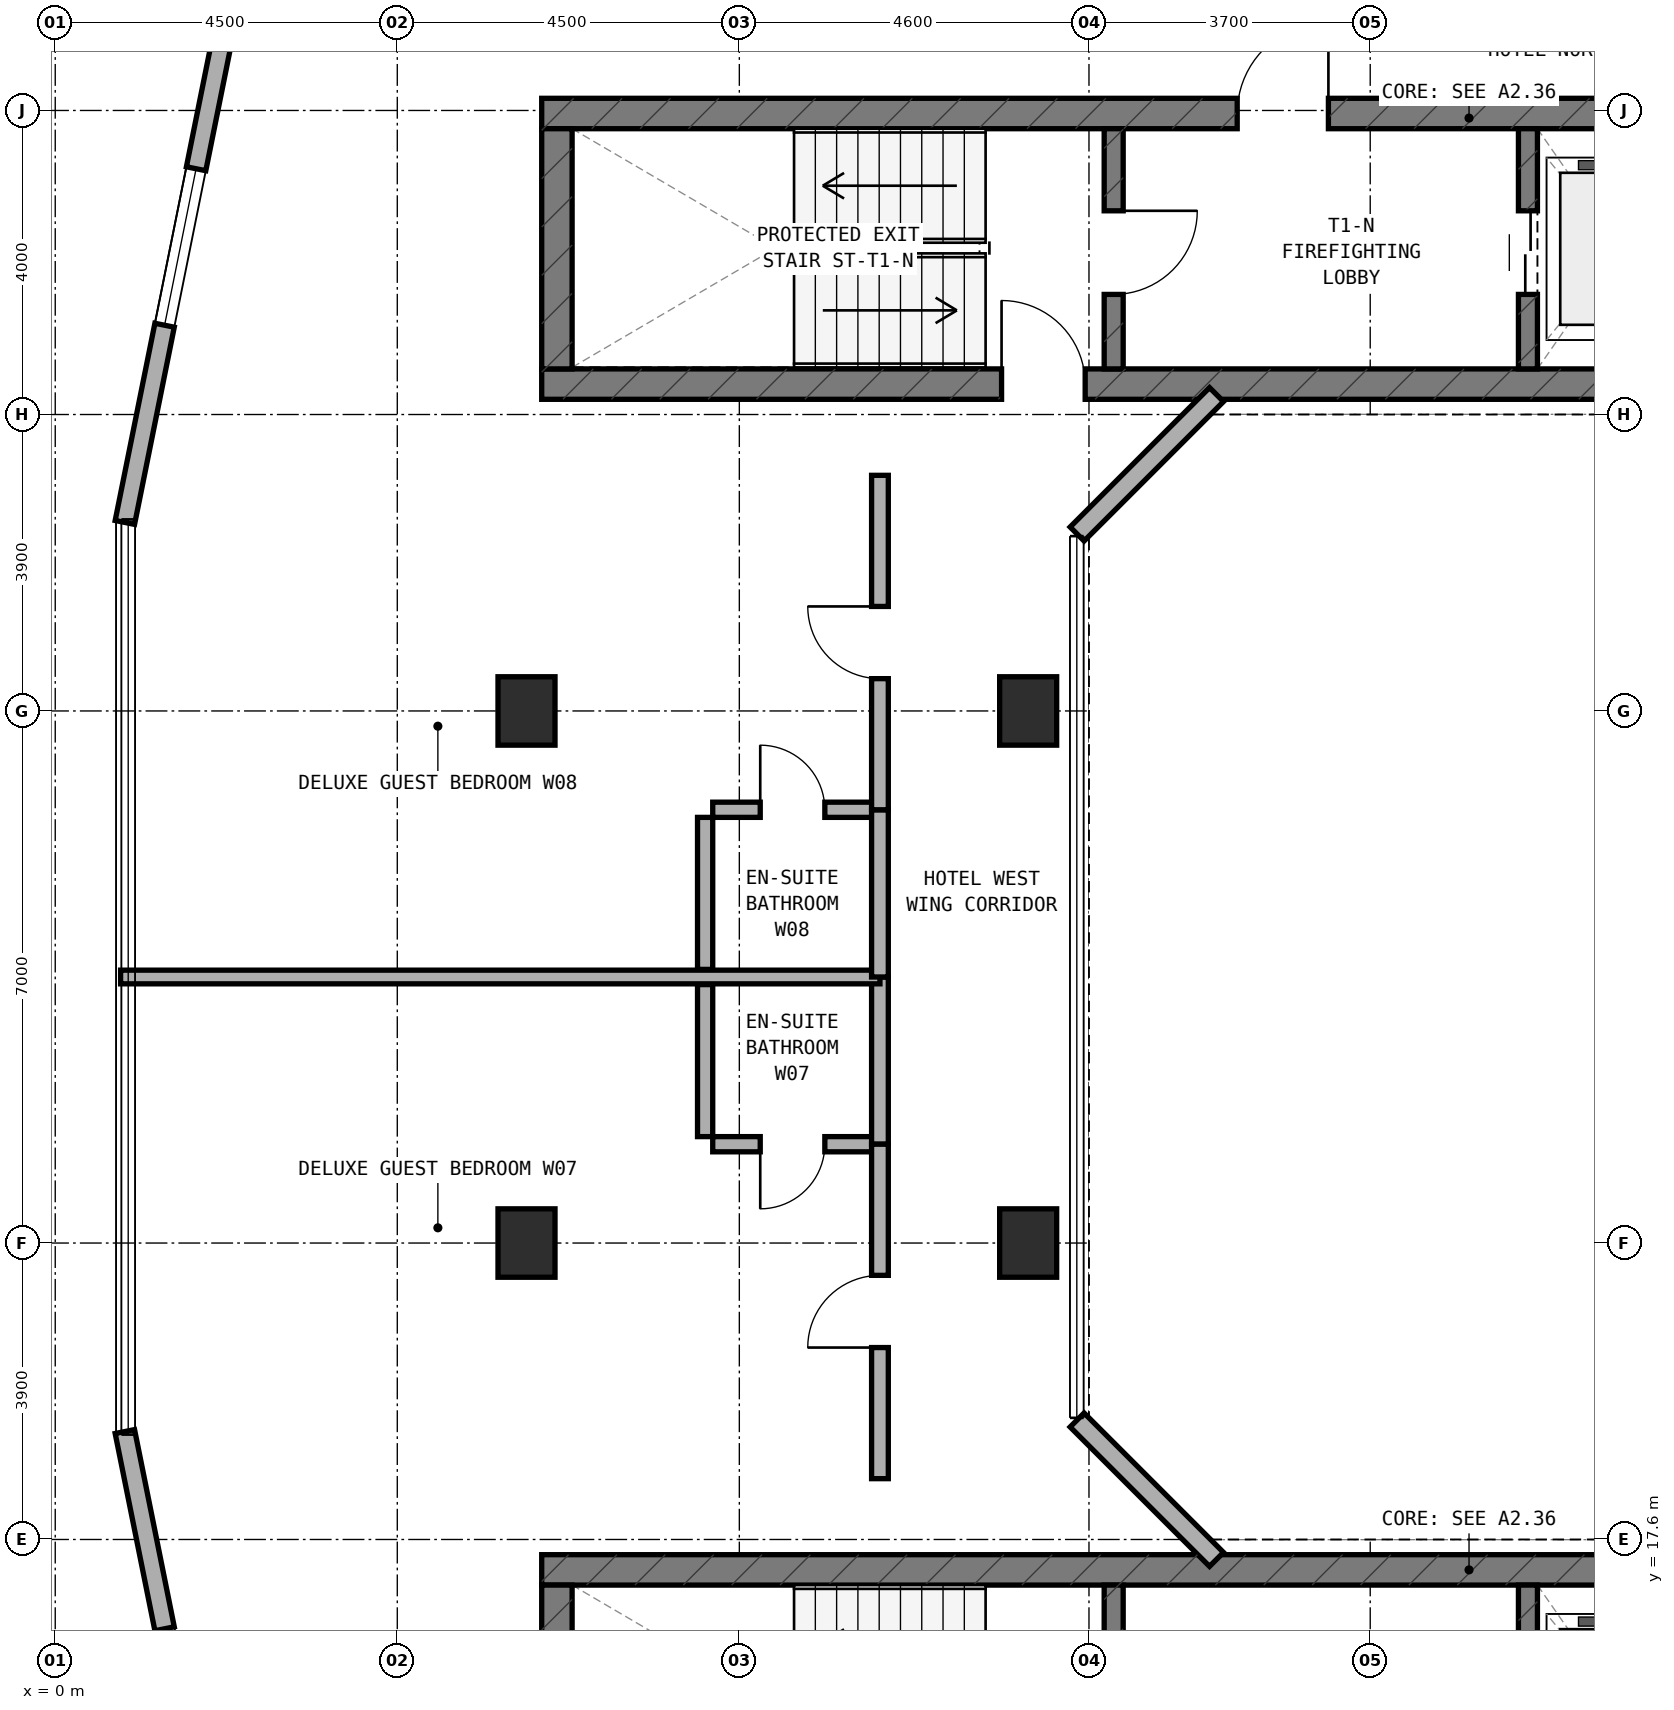
"""IFC4 building model, lengths in metres.
Left out: names, types, materials, properties, quantities, classifications, styles, units other than length and angle.
Written with IfcOpenShell. Run it as: python <this file> out.ifc"""

import sys

from ifc_helpers import new_model, si_unit, direction, frame, frame_2d, origin, origin_2d, place, context, subcontext, project, spatial, rectangle, extrude, element, fill, save


model = new_model("IFC4")
c1 = context("Model", 3, precision=1e-05, world=origin(), true_north=direction((0.0, 1.0)))
c2 = subcontext(c1, "Body", "Model", "MODEL_VIEW")
j1 = project(units=[si_unit("LENGTHUNIT", "METRE"), si_unit("PLANEANGLEUNIT", "RADIAN")], contexts=[c1])
p1 = place(None, origin())
s1 = spatial("IfcSite", under=j1, at=p1, CompositionType="ELEMENT")
p2 = place(p1, origin())
s2 = spatial("IfcBuilding", under=s1, at=p2, CompositionType="ELEMENT")
p3 = place(p2, frame((0.0, 0.0, 159.0)))
s3 = spatial("IfcBuildingStorey", under=s2, at=p3, CompositionType="ELEMENT", Elevation=159.0)
p4 = place(p3, frame((6.4, 32.8, 0.0), z_axis=(0.0, 0.0, 1.0), x_axis=(1.0, 0.0, 0.0)))
e1 = element("IfcWall", 1, at=p4, inside=s3, PredefinedType="SHEAR", context=c2, shape_type="SweptSolid", body=[
    extrude(rectangle(XDim=24.4, YDim=0.4, at=frame_2d((12.2, 0.0))), origin(), (0.0, 0.0, 1.0), 3.5),
])
p5 = place(p4, frame((6.05, 0.0, 0.0)))
e2 = element("IfcOpeningElement", 2, at=p5, cuts=e1, PredefinedType="OPENING", context=c2, shape_type="SweptSolid", body=[
    extrude(rectangle(XDim=1.1, YDim=2.15, at=frame_2d((0.55, 1.075))), frame((0.0, 0.21, 0.0), z_axis=(0.0, -1.0, 0.0), x_axis=(1.0, 0.0, 0.0)), (0.0, 0.0, 1.0), 0.42),
])
p6 = place(p3, frame((6.4, 36.36, 0.0), z_axis=(0.0, 0.0, 1.0), x_axis=(1.0, 0.0, 0.0)))
e3 = element("IfcWall", 3, at=p6, inside=s3, PredefinedType="SHEAR", context=c2, shape_type="SweptSolid", body=[
    extrude(rectangle(XDim=24.4, YDim=0.4, at=frame_2d((12.2, 0.0))), origin(), (0.0, 0.0, 1.0), 3.5),
])
p7 = place(p6, frame((9.15, 0.0, 0.0)))
e4 = element("IfcOpeningElement", 4, at=p7, cuts=e3, PredefinedType="OPENING", context=c2, shape_type="SweptSolid", body=[
    extrude(rectangle(XDim=1.2, YDim=2.15, at=frame_2d((0.6, 1.075))), frame((0.0, 0.21, 0.0), z_axis=(0.0, -1.0, 0.0), x_axis=(1.0, 0.0, 0.0)), (0.0, 0.0, 1.0), 0.42),
])
p8 = place(p6, frame((19.2, 0.0, 0.0)))
e5 = element("IfcOpeningElement", 5, at=p8, cuts=e3, PredefinedType="OPENING", context=c2, shape_type="SweptSolid", body=[
    extrude(rectangle(XDim=0.85, YDim=2.1, at=frame_2d((0.425, 1.05))), frame((0.0, 0.21, 0.0), z_axis=(0.0, -1.0, 0.0), x_axis=(1.0, 0.0, 0.0)), (0.0, 0.0, 1.0), 0.42),
])
p9 = place(p6, frame((16.94, 0.0, 0.0)))
e6 = element("IfcOpeningElement", 6, at=p9, cuts=e3, PredefinedType="OPENING", context=c2, shape_type="SweptSolid", body=[
    extrude(rectangle(XDim=0.85, YDim=2.1, at=frame_2d((0.425, 1.05))), frame((0.0, 0.21, 0.0), z_axis=(0.0, -1.0, 0.0), x_axis=(1.0, 0.0, 0.0)), (0.0, 0.0, 1.0), 0.42),
])
p10 = place(p3, frame((6.6, 33.0, 0.0), z_axis=(0.0, 0.0, 1.0), x_axis=(0.0, 1.0, 0.0)))
e7 = element("IfcWall", 7, at=p10, inside=s3, PredefinedType="SHEAR", context=c2, shape_type="SweptSolid", body=[
    extrude(rectangle(XDim=3.16, YDim=0.4, at=frame_2d((1.58, 0.0))), origin(), (0.0, 0.0, 1.0), 3.5),
])
p11 = place(p3, frame((13.925, 33.0, 0.0), z_axis=(0.0, 0.0, 1.0), x_axis=(0.0, 1.0, 0.0)))
e8 = element("IfcWall", 8, at=p11, inside=s3, PredefinedType="STANDARD", context=c2, shape_type="SweptSolid", body=[
    extrude(rectangle(XDim=3.16, YDim=0.25, at=frame_2d((1.58, 0.0))), origin(), (0.0, 0.0, 1.0), 3.22),
])
p12 = place(p11, frame((0.98, 0.0, 0.0)))
e9 = element("IfcOpeningElement", 9, at=p12, cuts=e8, PredefinedType="OPENING", context=c2, shape_type="SweptSolid", body=[
    extrude(rectangle(XDim=1.1, YDim=2.15, at=frame_2d((0.55, 1.075))), frame((0.0, 0.135, 0.0), z_axis=(0.0, -1.0, 0.0), x_axis=(1.0, 0.0, 0.0)), (0.0, 0.0, 1.0), 0.27),
])
p13 = place(p3, frame((19.375, 33.0, 0.0), z_axis=(0.0, 0.0, 1.0), x_axis=(0.0, 1.0, 0.0)))
e10 = element("IfcWall", 10, at=p13, inside=s3, PredefinedType="STANDARD", context=c2, shape_type="SweptSolid", body=[
    extrude(rectangle(XDim=3.16, YDim=0.25, at=frame_2d((1.58, 0.0))), origin(), (0.0, 0.0, 1.0), 3.22),
])
p14 = place(p13, frame((0.98, 0.0, 0.0)))
e11 = element("IfcOpeningElement", 11, at=p14, cuts=e10, PredefinedType="OPENING", context=c2, shape_type="SweptSolid", body=[
    extrude(rectangle(XDim=1.1, YDim=2.15, at=frame_2d((0.55, 1.075))), frame((0.0, 0.135, 0.0), z_axis=(0.0, -1.0, 0.0), x_axis=(1.0, 0.0, 0.0)), (0.0, 0.0, 1.0), 0.27),
])
p15 = place(p3, frame((6.4, 17.2, 0.0), z_axis=(0.0, 0.0, 1.0), x_axis=(1.0, 0.0, 0.0)))
e12 = element("IfcWall", 12, at=p15, inside=s3, PredefinedType="SHEAR", context=c2, shape_type="SweptSolid", body=[
    extrude(rectangle(XDim=24.4, YDim=0.4, at=frame_2d((12.2, 0.0))), origin(), (0.0, 0.0, 1.0), 3.5),
])
p16 = place(p3, frame((6.6, 13.84, 0.0), z_axis=(0.0, 0.0, 1.0), x_axis=(0.0, 1.0, 0.0)))
e13 = element("IfcWall", 13, at=p16, inside=s3, PredefinedType="SHEAR", context=c2, shape_type="SweptSolid", body=[
    extrude(rectangle(XDim=3.16, YDim=0.4, at=frame_2d((1.58, 0.0))), origin(), (0.0, 0.0, 1.0), 3.5),
])
p17 = place(p3, frame((13.925, 13.84, 0.0), z_axis=(0.0, 0.0, 1.0), x_axis=(0.0, 1.0, 0.0)))
e14 = element("IfcWall", 14, at=p17, inside=s3, PredefinedType="STANDARD", context=c2, shape_type="SweptSolid", body=[
    extrude(rectangle(XDim=3.16, YDim=0.25, at=frame_2d((1.58, 0.0))), origin(), (0.0, 0.0, 1.0), 3.22),
])
p18 = place(p17, frame((0.98, 0.0, 0.0)))
e15 = element("IfcOpeningElement", 15, at=p18, cuts=e14, PredefinedType="OPENING", context=c2, shape_type="SweptSolid", body=[
    extrude(rectangle(XDim=1.1, YDim=2.15, at=frame_2d((0.55, 1.075))), frame((0.0, 0.135, 0.0), z_axis=(0.0, -1.0, 0.0), x_axis=(1.0, 0.0, 0.0)), (0.0, 0.0, 1.0), 0.27),
])
p19 = place(p3, frame((19.375, 13.84, 0.0), z_axis=(0.0, 0.0, 1.0), x_axis=(0.0, 1.0, 0.0)))
e16 = element("IfcWall", 16, at=p19, inside=s3, PredefinedType="STANDARD", context=c2, shape_type="SweptSolid", body=[
    extrude(rectangle(XDim=3.16, YDim=0.25, at=frame_2d((1.58, 0.0))), origin(), (0.0, 0.0, 1.0), 3.22),
])
p20 = place(p19, frame((0.98, 0.0, 0.0)))
e17 = element("IfcOpeningElement", 17, at=p20, cuts=e16, PredefinedType="OPENING", context=c2, shape_type="SweptSolid", body=[
    extrude(rectangle(XDim=1.1, YDim=2.15, at=frame_2d((0.55, 1.075))), frame((0.0, 0.135, 0.0), z_axis=(0.0, -1.0, 0.0), x_axis=(1.0, 0.0, 0.0)), (0.0, 0.0, 1.0), 0.27),
])
for number, where, z_axis, x_axis in (
    (18, (6.2, 21.5, 0.0), (0.0, 0.0, 1.0), (1.0, 0.0, 0.0)),
    (19, (6.2, 28.5, 0.0), (0.0, 0.0, 1.0), (1.0, 0.0, 0.0)),
    (20, (12.8, 21.5, 0.0), (0.0, 0.0, 1.0), (1.0, 0.0, 0.0)),
    (21, (12.8, 28.5, 0.0), (0.0, 0.0, 1.0), (1.0, 0.0, 0.0)),
):
    element("IfcColumn", number, at=place(p3, frame(where, z_axis=z_axis, x_axis=x_axis)), inside=s3, PredefinedType="COLUMN", context=c2, shape_type="SweptSolid", body=[
        extrude(rectangle(XDim=0.75, YDim=0.9, at=origin_2d()), origin(), (0.0, 0.0, 1.0), 3.5),
    ])
p21 = place(p3, frame((2.729, 39.982, 0.0), z_axis=(0.0, 0.0, 1.0), x_axis=(-0.197435082048, -0.980315963543, 0.0)))
e22 = element("IfcWall", 22, at=p21, inside=s3, PredefinedType="STANDARD", context=c2, shape_type="SweptSolid", body=[
    extrude(rectangle(XDim=9.183, YDim=0.26, at=frame_2d((4.591, 0.0))), origin(), (0.0, 0.0, 1.0), 3.22),
])
p22 = place(p21, frame((4.436, 0.0, 0.85)))
e23 = element("IfcOpeningElement", 23, at=p22, cuts=e22, PredefinedType="OPENING", context=c2, shape_type="SweptSolid", body=[
    extrude(rectangle(XDim=2.1, YDim=1.5, at=frame_2d((1.05, 0.75))), frame((0.0, 0.14, 0.0), z_axis=(0.0, -1.0, 0.0), x_axis=(1.0, 0.0, 0.0)), (0.0, 0.0, 1.0), 0.28),
])
p23 = place(p3, frame((0.916, 19.02, 0.0), z_axis=(0.0, 0.0, 1.0), x_axis=(0.197435082048, -0.980315963543, 0.0)))
e24 = element("IfcWall", 24, at=p23, inside=s3, PredefinedType="STANDARD", context=c2, shape_type="SweptSolid", body=[
    extrude(rectangle(XDim=9.183, YDim=0.26, at=frame_2d((4.591, 0.0))), origin(), (0.0, 0.0, 1.0), 3.22),
])
p24 = place(p23, frame((2.647, 0.0, 0.85)))
e25 = element("IfcOpeningElement", 25, at=p24, cuts=e24, PredefinedType="OPENING", context=c2, shape_type="SweptSolid", body=[
    extrude(rectangle(XDim=2.1, YDim=1.5, at=frame_2d((1.05, 0.75))), frame((0.0, 0.14, 0.0), z_axis=(0.0, -1.0, 0.0), x_axis=(1.0, 0.0, 0.0)), (0.0, 0.0, 1.0), 0.28),
])
for number, where, z_axis, x_axis in (
    (26, (15.278, 32.662, 0.0), (0.0, 0.0, 1.0), (-0.707, -0.707, 0.0)),
    (27, (13.444, 19.172, 0.0), (0.0, 0.0, 1.0), (0.707, -0.707, 0.0)),
):
    element("IfcWall", number, at=place(p3, frame(where, z_axis=z_axis, x_axis=x_axis)), inside=s3, PredefinedType="STANDARD", context=c2, shape_type="SweptSolid", body=[
        extrude(rectangle(XDim=2.594, YDim=0.26, at=frame_2d((1.297, 0.0))), origin(), (0.0, 0.0, 1.0), 3.22),
    ])
p25 = place(p3, frame((8.65, 22.8, 0.0), z_axis=(0.0, 0.0, 1.0), x_axis=(1.0, 0.0, 0.0)))
e28 = element("IfcWall", 28, at=p25, inside=s3, PredefinedType="PLUMBINGWALL", context=c2, shape_type="SweptSolid", body=[
    extrude(rectangle(XDim=2.1, YDim=0.2, at=frame_2d((1.05, 0.0))), origin(), (0.0, 0.0, 1.0), 3.22),
])
p26 = place(p25, frame((0.625, 0.0, 0.0)))
e29 = element("IfcOpeningElement", 29, at=p26, cuts=e28, PredefinedType="OPENING", context=c2, shape_type="SweptSolid", body=[
    extrude(rectangle(XDim=0.85, YDim=2.1, at=frame_2d((0.425, 1.05))), frame((0.0, 0.11, 0.0), z_axis=(0.0, -1.0, 0.0), x_axis=(1.0, 0.0, 0.0)), (0.0, 0.0, 1.0), 0.22),
])
p27 = place(p3, frame((8.55, 22.9, 0.0), z_axis=(0.0, 0.0, 1.0), x_axis=(0.0, 1.0, 0.0)))
e30 = element("IfcWall", 30, at=p27, inside=s3, PredefinedType="PLUMBINGWALL", context=c2, shape_type="SweptSolid", body=[
    extrude(rectangle(XDim=2.0, YDim=0.2, at=frame_2d((1.0, 0.0))), origin(), (0.0, 0.0, 1.0), 3.22),
])
p28 = place(p3, frame((10.85, 22.8, 0.0), z_axis=(0.0, 0.0, 1.0), x_axis=(0.0, 1.0, 0.0)))
e31 = element("IfcWall", 31, at=p28, inside=s3, PredefinedType="SOLIDWALL", context=c2, shape_type="SweptSolid", body=[
    extrude(rectangle(XDim=2.2, YDim=0.22, at=frame_2d((1.1, 0.0))), origin(), (0.0, 0.0, 1.0), 3.22),
])
p29 = place(p3, frame((10.85, 18.4, 0.0), z_axis=(0.0, 0.0, 1.0), x_axis=(0.0, 1.0, 0.0)))
e32 = element("IfcWall", 32, at=p29, inside=s3, PredefinedType="SOLIDWALL", context=c2, shape_type="SweptSolid", body=[
    extrude(rectangle(XDim=4.4, YDim=0.22, at=frame_2d((2.2, 0.0))), origin(), (0.0, 0.0, 1.0), 2.795),
])
p30 = place(p29, frame((1.725, 0.0, 0.0)))
e33 = element("IfcOpeningElement", 33, at=p30, cuts=e32, PredefinedType="OPENING", context=c2, shape_type="SweptSolid", body=[
    extrude(rectangle(XDim=0.95, YDim=2.1, at=frame_2d((0.475, 1.05))), frame((0.0, 0.12, 0.0), z_axis=(0.0, -1.0, 0.0), x_axis=(1.0, 0.0, 0.0)), (0.0, 0.0, 1.0), 0.24),
])
p31 = place(p3, frame((0.86, 25.0, 0.0), z_axis=(0.0, 0.0, 1.0), x_axis=(1.0, 0.0, 0.0)))
e34 = element("IfcWall", 34, at=p31, inside=s3, PredefinedType="SOLIDWALL", context=c2, shape_type="SweptSolid", body=[
    extrude(rectangle(XDim=9.99, YDim=0.18, at=frame_2d((4.995, 0.0))), origin(), (0.0, 0.0, 1.0), 2.835),
])
p32 = place(p3, frame((8.65, 27.2, 0.0), z_axis=(0.0, 0.0, 1.0), x_axis=(1.0, 0.0, 0.0)))
e35 = element("IfcWall", 35, at=p32, inside=s3, PredefinedType="PLUMBINGWALL", context=c2, shape_type="SweptSolid", body=[
    extrude(rectangle(XDim=2.1, YDim=0.2, at=frame_2d((1.05, 0.0))), origin(), (0.0, 0.0, 1.0), 3.22),
])
p33 = place(p32, frame((0.625, 0.0, 0.0)))
e36 = element("IfcOpeningElement", 36, at=p33, cuts=e35, PredefinedType="OPENING", context=c2, shape_type="SweptSolid", body=[
    extrude(rectangle(XDim=0.85, YDim=2.1, at=frame_2d((0.425, 1.05))), frame((0.0, 0.11, 0.0), z_axis=(0.0, -1.0, 0.0), x_axis=(1.0, 0.0, 0.0)), (0.0, 0.0, 1.0), 0.22),
])
p34 = place(p3, frame((8.55, 25.1, 0.0), z_axis=(0.0, 0.0, 1.0), x_axis=(0.0, 1.0, 0.0)))
e37 = element("IfcWall", 37, at=p34, inside=s3, PredefinedType="PLUMBINGWALL", context=c2, shape_type="SweptSolid", body=[
    extrude(rectangle(XDim=2.0, YDim=0.2, at=frame_2d((1.0, 0.0))), origin(), (0.0, 0.0, 1.0), 3.22),
])
p35 = place(p3, frame((10.85, 25.0, 0.0), z_axis=(0.0, 0.0, 1.0), x_axis=(0.0, 1.0, 0.0)))
e38 = element("IfcWall", 38, at=p35, inside=s3, PredefinedType="SOLIDWALL", context=c2, shape_type="SweptSolid", body=[
    extrude(rectangle(XDim=2.2, YDim=0.22, at=frame_2d((1.1, 0.0))), origin(), (0.0, 0.0, 1.0), 3.22),
])
p36 = place(p3, frame((10.85, 27.2, 0.0), z_axis=(0.0, 0.0, 1.0), x_axis=(0.0, 1.0, 0.0)))
e39 = element("IfcWall", 39, at=p36, inside=s3, PredefinedType="SOLIDWALL", context=c2, shape_type="SweptSolid", body=[
    extrude(rectangle(XDim=4.4, YDim=0.22, at=frame_2d((2.2, 0.0))), origin(), (0.0, 0.0, 1.0), 2.795),
])
p37 = place(p36, frame((1.725, 0.0, 0.0)))
e40 = element("IfcOpeningElement", 40, at=p37, cuts=e39, PredefinedType="OPENING", context=c2, shape_type="SweptSolid", body=[
    extrude(rectangle(XDim=0.95, YDim=2.1, at=frame_2d((0.475, 1.05))), frame((0.0, 0.12, 0.0), z_axis=(0.0, -1.0, 0.0), x_axis=(1.0, 0.0, 0.0)), (0.0, 0.0, 1.0), 0.24),
])
p38 = place(p22, origin())
e41 = element("IfcWindow", 41, at=p38, inside=s3, PartitioningType="SINGLE_PANEL", PredefinedType="WINDOW", context=c2, shape_type="SweptSolid", body=[
    extrude(rectangle(XDim=2.1, YDim=1.5, at=frame_2d((1.05, 0.75))), frame((0.0, 0.03, 0.0), z_axis=(0.0, -1.0, 0.0), x_axis=(1.0, 0.0, 0.0)), (0.0, 0.0, 1.0), 0.06),
])
fill(e23, e41)
p39 = place(p24, origin())
e42 = element("IfcWindow", 42, at=p39, inside=s3, PartitioningType="SINGLE_PANEL", PredefinedType="WINDOW", context=c2, shape_type="SweptSolid", body=[
    extrude(rectangle(XDim=2.1, YDim=1.5, at=frame_2d((1.05, 0.75))), frame((0.0, 0.03, 0.0), z_axis=(0.0, -1.0, 0.0), x_axis=(1.0, 0.0, 0.0)), (0.0, 0.0, 1.0), 0.06),
])
fill(e25, e42)
p40 = place(p12, frame((1.1, 0.0, 0.0), z_axis=(0.0, 0.0, 1.0), x_axis=(-1.0, 0.0, 0.0)))
e43 = element("IfcDoor", 43, at=p40, inside=s3, OperationType="SINGLE_SWING_LEFT", PredefinedType="DOOR", context=c2, shape_type="SweptSolid", body=[
    extrude(rectangle(XDim=1.1, YDim=2.15, at=frame_2d((0.55, 1.075))), frame((0.0, 0.025, 0.0), z_axis=(0.0, -1.0, 0.0), x_axis=(1.0, 0.0, 0.0)), (0.0, 0.0, 1.0), 0.05),
])
fill(e9, e43)
p41 = place(p7, origin())
e44 = element("IfcDoor", 44, at=p41, inside=s3, OperationType="SINGLE_SWING_RIGHT", PredefinedType="DOOR", context=c2, shape_type="SweptSolid", body=[
    extrude(rectangle(XDim=1.2, YDim=2.15, at=frame_2d((0.6, 1.075))), frame((0.0, 0.025, 0.0), z_axis=(0.0, -1.0, 0.0), x_axis=(1.0, 0.0, 0.0)), (0.0, 0.0, 1.0), 0.05),
])
fill(e4, e44)
p42 = place(p14, origin())
e45 = element("IfcDoor", 45, at=p42, inside=s3, OperationType="DOUBLE_DOOR_SLIDING", PredefinedType="DOOR", context=c2, shape_type="SweptSolid", body=[
    extrude(rectangle(XDim=1.1, YDim=2.15, at=frame_2d((0.55, 1.075))), frame((0.0, 0.025, 0.0), z_axis=(0.0, -1.0, 0.0), x_axis=(1.0, 0.0, 0.0)), (0.0, 0.0, 1.0), 0.05),
])
fill(e11, e45)
p43 = place(p5, origin())
e46 = element("IfcDoor", 46, at=p43, inside=s3, OperationType="SINGLE_SWING_LEFT", PredefinedType="DOOR", context=c2, shape_type="SweptSolid", body=[
    extrude(rectangle(XDim=1.1, YDim=2.15, at=frame_2d((0.55, 1.075))), frame((0.0, 0.025, 0.0), z_axis=(0.0, -1.0, 0.0), x_axis=(1.0, 0.0, 0.0)), (0.0, 0.0, 1.0), 0.05),
])
fill(e2, e46)
p44 = place(p26, frame((0.85, 0.0, 0.0), z_axis=(0.0, 0.0, 1.0), x_axis=(-1.0, 0.0, 0.0)))
e47 = element("IfcDoor", 47, at=p44, inside=s3, OperationType="SINGLE_SWING_RIGHT", PredefinedType="DOOR", context=c2, shape_type="SweptSolid", body=[
    extrude(rectangle(XDim=0.85, YDim=2.1, at=frame_2d((0.425, 1.05))), frame((0.0, 0.025, 0.0), z_axis=(0.0, -1.0, 0.0), x_axis=(1.0, 0.0, 0.0)), (0.0, 0.0, 1.0), 0.05),
])
fill(e29, e47)
p45 = place(p30, origin())
e48 = element("IfcDoor", 48, at=p45, inside=s3, OperationType="SINGLE_SWING_LEFT", PredefinedType="DOOR", context=c2, shape_type="SweptSolid", body=[
    extrude(rectangle(XDim=0.95, YDim=2.1, at=frame_2d((0.475, 1.05))), frame((0.0, 0.025, 0.0), z_axis=(0.0, -1.0, 0.0), x_axis=(1.0, 0.0, 0.0)), (0.0, 0.0, 1.0), 0.05),
])
fill(e33, e48)
p46 = place(p33, origin())
e49 = element("IfcDoor", 49, at=p46, inside=s3, OperationType="SINGLE_SWING_LEFT", PredefinedType="DOOR", context=c2, shape_type="SweptSolid", body=[
    extrude(rectangle(XDim=0.85, YDim=2.1, at=frame_2d((0.425, 1.05))), frame((0.0, 0.025, 0.0), z_axis=(0.0, -1.0, 0.0), x_axis=(1.0, 0.0, 0.0)), (0.0, 0.0, 1.0), 0.05),
])
fill(e36, e49)
p47 = place(p37, origin())
e50 = element("IfcDoor", 50, at=p47, inside=s3, OperationType="SINGLE_SWING_RIGHT", PredefinedType="DOOR", context=c2, shape_type="SweptSolid", body=[
    extrude(rectangle(XDim=0.95, YDim=2.1, at=frame_2d((0.475, 1.05))), frame((0.0, 0.025, 0.0), z_axis=(0.0, -1.0, 0.0), x_axis=(1.0, 0.0, 0.0)), (0.0, 0.0, 1.0), 0.05),
])
fill(e40, e50)
save(model, sys.argv[1])
